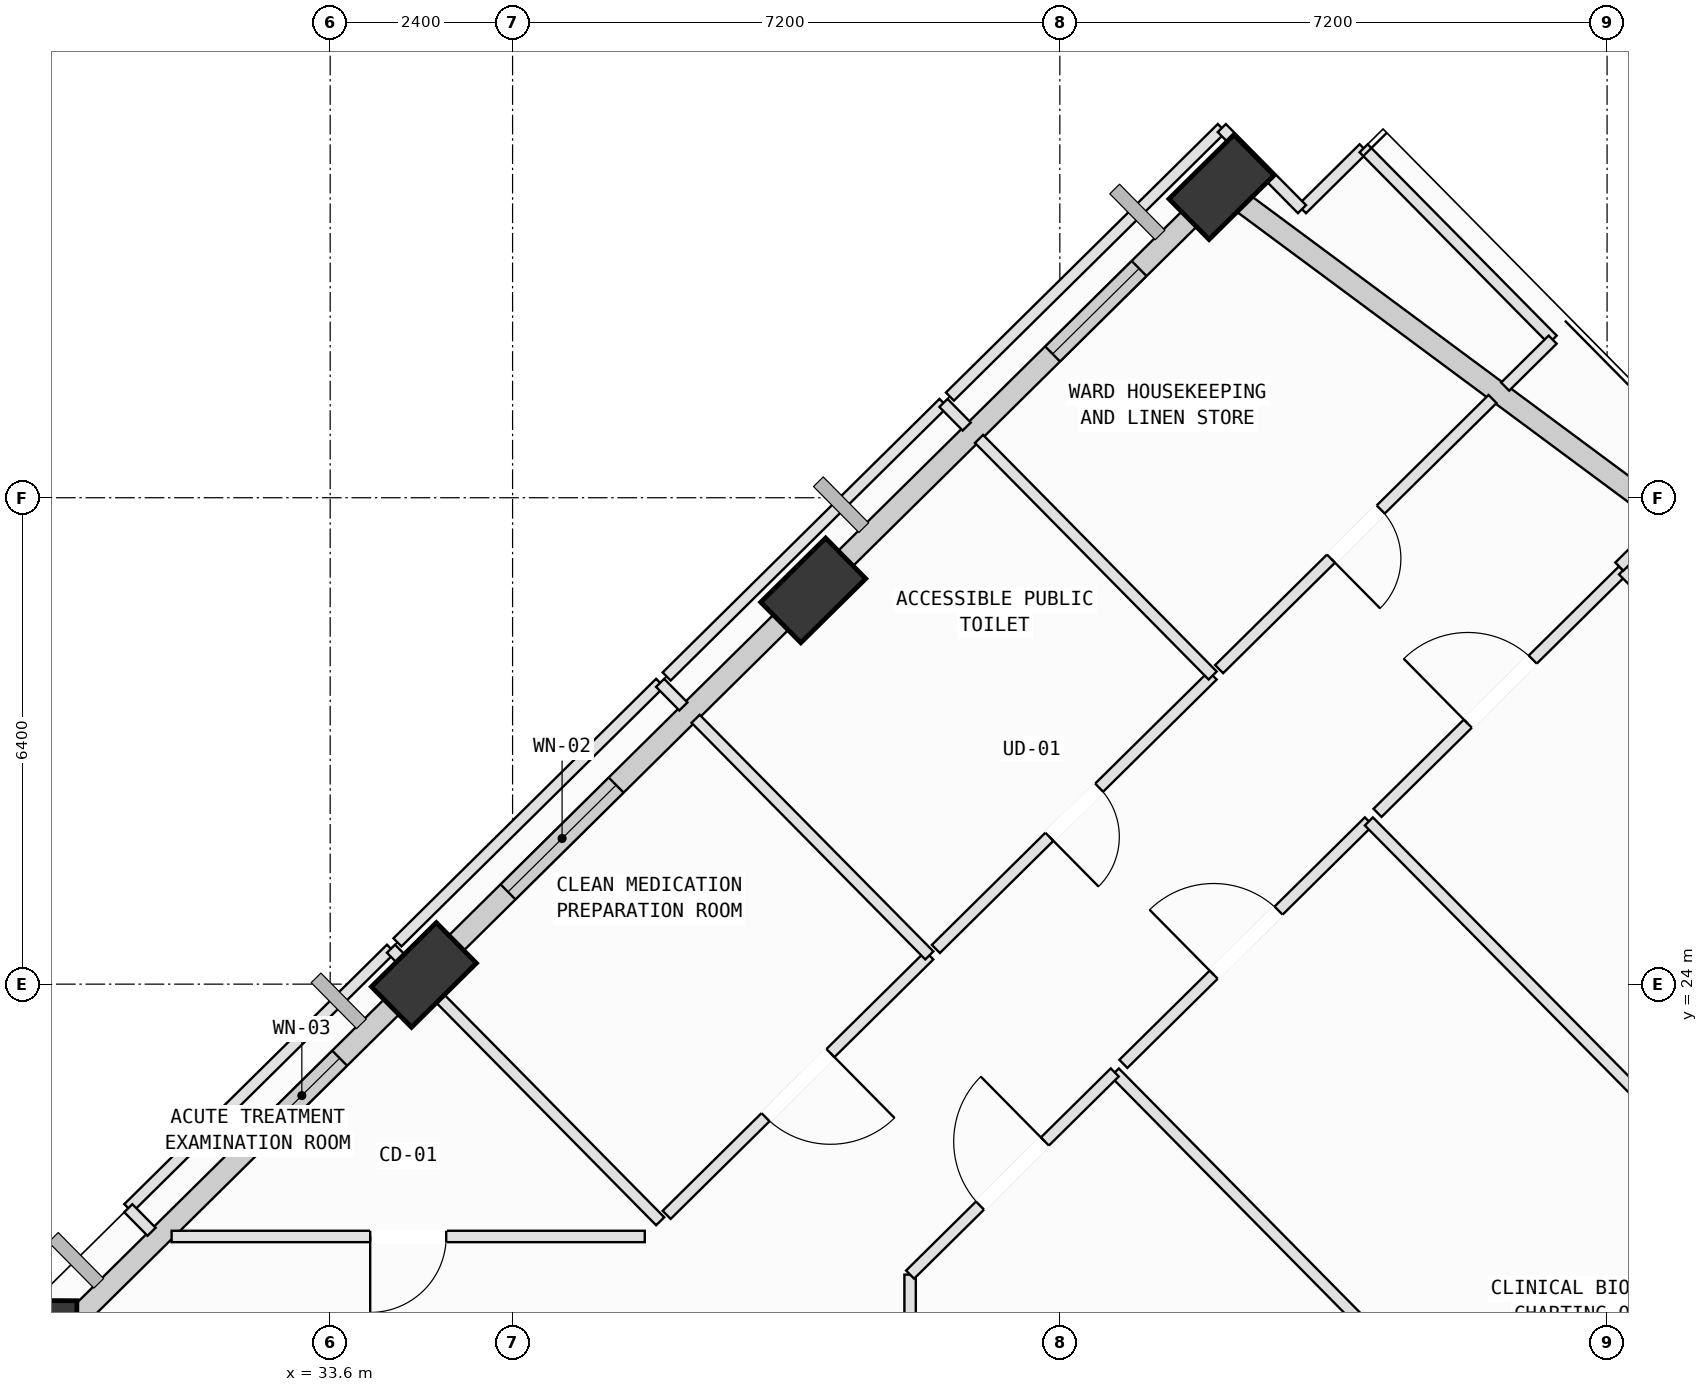
"""IFC4 building model, lengths in metres.
Left out: names, types, materials, properties, quantities, classifications, styles, units other than length and angle.
Written with IfcOpenShell. Run it as: python <this file> out.ifc"""

import sys

from ifc_helpers import new_model, si_unit, direction, frame, frame_2d, origin, origin_2d, place, context, subcontext, project, spatial, rectangle, extrude, element, fill, save


model = new_model("IFC4")
c1 = context("Model", 3, precision=1e-05, world=origin(), true_north=direction((0.0, 1.0)))
c2 = subcontext(c1, "Body", "Model", "MODEL_VIEW")
j1 = project(units=[si_unit("LENGTHUNIT", "METRE"), si_unit("PLANEANGLEUNIT", "RADIAN")], contexts=[c1])
p1 = place(None, origin())
s1 = spatial("IfcSite", under=j1, at=p1, CompositionType="ELEMENT")
p2 = place(p1, origin())
s2 = spatial("IfcBuilding", under=s1, at=p2, CompositionType="ELEMENT")
p3 = place(p2, frame((0.0, 0.0, 215.2)))
s3 = spatial("IfcBuildingStorey", under=s2, at=p3, CompositionType="ELEMENT", Elevation=215.2)
p4 = place(p3, frame((45.327, 34.487, 0.002), z_axis=(-0.040484105469, 0.048166330302, 0.998018557858), x_axis=(-0.093314100601, -0.994654303184, 0.044218726661)))
e1 = element("IfcColumn", 1, at=p4, inside=s3, PredefinedType="COLUMN", context=c2, shape_type="SweptSolid", body=[
    extrude(rectangle(XDim=1.2, YDim=0.75, at=origin_2d()), origin(), (0.0, 0.0, 1.0), 4.004),
])
p5 = place(p3, frame((39.956, 29.181, 0.002), z_axis=(-0.018379000331, 0.026194654957, 0.999487895074), x_axis=(-0.178927925316, -0.983605143605, 0.022488197268)))
e2 = element("IfcColumn", 2, at=p5, inside=s3, PredefinedType="COLUMN", context=c2, shape_type="SweptSolid", body=[
    extrude(rectangle(XDim=1.2, YDim=0.75, at=origin_2d()), origin(), (0.0, 0.0, 1.0), 3.998),
])
p6 = place(p3, frame((34.833, 24.121, 0.002), z_axis=(0.002810141897, 0.005131563464, 0.999982884933), x_axis=(-0.961524635642, -0.274687948817, 0.004111669677)))
e3 = element("IfcColumn", 3, at=p6, inside=s3, PredefinedType="COLUMN", context=c2, shape_type="SweptSolid", body=[
    extrude(rectangle(XDim=1.2, YDim=0.75, at=origin_2d()), origin(), (0.0, 0.0, 1.0), 3.996),
])
p7 = place(p3, frame((29.889, 19.236, 0.002), z_axis=(0.023205698391, -0.015144771581, 0.999615991997), x_axis=(-0.83375940471, 0.551432149195, 0.027709924051)))
e4 = element("IfcColumn", 4, at=p7, inside=s3, PredefinedType="COLUMN", context=c2, shape_type="SweptSolid", body=[
    extrude(rectangle(XDim=1.2, YDim=0.75, at=origin_2d()), origin(), (0.0, 0.0, 1.0), 3.998),
])
p8 = place(p3, frame((45.547, 34.323, 0.0), z_axis=(0.0, 0.0, 1.0), x_axis=(0.803236884765, -0.595659724131, 0.0)))
e5 = element("IfcWall", 5, at=p8, inside=s3, PredefinedType="SOLIDWALL", context=c2, shape_type="SweptSolid", body=[
    extrude(rectangle(XDim=9.036, YDim=0.28, at=frame_2d((4.518, 0.0))), origin(), (0.0, 0.0, 1.0), 3.265),
])
p9 = place(p3, frame((40.242, 29.464, 0.0), z_axis=(0.0, 0.0, 1.0), x_axis=(0.711432569106, 0.702754366486, 0.0)))
e6 = element("IfcWall", 6, at=p9, inside=s3, PredefinedType="SOLIDWALL", context=c2, shape_type="SweptSolid", body=[
    extrude(rectangle(XDim=6.78, YDim=0.28, at=frame_2d((3.39, 0.0))), origin(), (0.0, 0.0, 1.0), 3.165),
])
p10 = place(p9, frame((4.024, 0.0, 0.75)))
e7 = element("IfcOpeningElement", 7, at=p10, cuts=e6, PredefinedType="OPENING", context=c2, shape_type="SweptSolid", body=[
    extrude(rectangle(XDim=1.6, YDim=1.95, at=frame_2d((0.8, 0.975))), frame((0.0, 0.15, 0.0), z_axis=(0.0, -1.0, 0.0), x_axis=(1.0, 0.0, 0.0)), (0.0, 0.0, 1.0), 0.3),
])
p11 = place(p3, frame((35.124, 24.408, 0.0), z_axis=(0.0, 0.0, 1.0), x_axis=(0.711416839959, 0.702770289513, 0.0)))
e8 = element("IfcWall", 8, at=p11, inside=s3, PredefinedType="SOLIDWALL", context=c2, shape_type="SweptSolid", body=[
    extrude(rectangle(XDim=6.409, YDim=0.28, at=frame_2d((3.205, 0.0))), origin(), (0.0, 0.0, 1.0), 3.265),
])
p12 = place(p11, frame((1.146, 0.0, 0.75)))
e9 = element("IfcOpeningElement", 9, at=p12, cuts=e8, PredefinedType="OPENING", context=c2, shape_type="SweptSolid", body=[
    extrude(rectangle(XDim=2.0, YDim=1.95, at=frame_2d((1.0, 0.975))), frame((0.0, 0.15, 0.0), z_axis=(0.0, -1.0, 0.0), x_axis=(1.0, 0.0, 0.0)), (0.0, 0.0, 1.0), 0.3),
])
p13 = place(p3, frame((30.177, 19.521, 0.0), z_axis=(0.0, 0.0, 1.0), x_axis=(0.711415033641, 0.702772118051, 0.0)))
e10 = element("IfcWall", 10, at=p13, inside=s3, PredefinedType="SOLIDWALL", context=c2, shape_type="SweptSolid", body=[
    extrude(rectangle(XDim=6.158, YDim=0.28, at=frame_2d((3.079, 0.0))), origin(), (0.0, 0.0, 1.0), 3.165),
])
p14 = place(p13, frame((3.587, 0.0, 0.75)))
e11 = element("IfcOpeningElement", 11, at=p14, cuts=e10, PredefinedType="OPENING", context=c2, shape_type="SweptSolid", body=[
    extrude(rectangle(XDim=1.4, YDim=1.85, at=frame_2d((0.7, 0.925))), frame((0.0, 0.15, 0.0), z_axis=(0.0, -1.0, 0.0), x_axis=(1.0, 0.0, 0.0)), (0.0, 0.0, 1.0), 0.3),
])
p15 = place(p3, frame((43.923, 22.838, 0.0), z_axis=(0.0, 0.0, 1.0), x_axis=(0.702757042413, -0.711429925811, 0.0)))
e12 = element("IfcWall", 12, at=p15, inside=s3, PredefinedType="PARTITIONING", context=c2, shape_type="SweptSolid", body=[
    extrude(rectangle(XDim=13.484, YDim=0.15, at=frame_2d((6.742, 0.0))), origin(), (0.0, 0.0, 1.0), 3.415),
])
p16 = place(p3, frame((41.23, 19.054, 0.0), z_axis=(0.0, 0.0, 1.0), x_axis=(0.0, 1.0, 0.0)))
e13 = element("IfcWall", 13, at=p16, inside=s3, PredefinedType="PARTITIONING", context=c2, shape_type="SweptSolid", body=[
    extrude(rectangle(XDim=1.124, YDim=0.15, at=frame_2d((0.562, 0.0))), origin(), (0.0, 0.0, 1.0), 3.78),
])
p17 = place(p3, frame((41.23, 20.178, 0.0), z_axis=(0.0, 0.0, 1.0), x_axis=(0.711479053184, 0.70270730527, 0.0)))
e14 = element("IfcWall", 14, at=p17, inside=s3, PredefinedType="PARTITIONING", context=c2, shape_type="SweptSolid", body=[
    extrude(rectangle(XDim=3.785, YDim=0.15, at=frame_2d((1.893, 0.0))), origin(), (0.0, 0.0, 1.0), 3.78),
])
p18 = place(p17, frame((1.292, 0.0, 0.0)))
e15 = element("IfcOpeningElement", 15, at=p18, cuts=e14, PredefinedType="OPENING", context=c2, shape_type="SweptSolid", body=[
    extrude(rectangle(XDim=1.2, YDim=2.15, at=frame_2d((0.6, 1.075))), frame((0.0, 0.085, 0.0), z_axis=(0.0, -1.0, 0.0), x_axis=(1.0, 0.0, 0.0)), (0.0, 0.0, 1.0), 0.17),
])
p19 = place(p3, frame((44.036, 22.951, 0.0), z_axis=(0.0, 0.0, 1.0), x_axis=(0.711502616413, 0.702683447107, 0.0)))
e16 = element("IfcWall", 16, at=p19, inside=s3, PredefinedType="PARTITIONING", context=c2, shape_type="SweptSolid", body=[
    extrude(rectangle(XDim=4.54, YDim=0.15, at=frame_2d((2.27, 0.0))), origin(), (0.0, 0.0, 1.0), 3.78),
])
p20 = place(p19, frame((1.67, 0.0, 0.0)))
e17 = element("IfcOpeningElement", 17, at=p20, cuts=e16, PredefinedType="OPENING", context=c2, shape_type="SweptSolid", body=[
    extrude(rectangle(XDim=1.2, YDim=2.15, at=frame_2d((0.6, 1.075))), frame((0.0, 0.085, 0.0), z_axis=(0.0, -1.0, 0.0), x_axis=(1.0, 0.0, 0.0)), (0.0, 0.0, 1.0), 0.17),
])
p21 = place(p3, frame((47.266, 26.141, 0.0), z_axis=(0.0, 0.0, 1.0), x_axis=(0.702821292956, -0.711366452799, 0.0)))
e18 = element("IfcWall", 18, at=p21, inside=s3, PredefinedType="PARTITIONING", context=c2, shape_type="SweptSolid", body=[
    extrude(rectangle(XDim=13.485, YDim=0.15, at=frame_2d((6.743, 0.0))), origin(), (0.0, 0.0, 1.0), 3.78),
])
p22 = place(p3, frame((47.38, 26.254, 0.0), z_axis=(0.0, 0.0, 1.0), x_axis=(0.711502616413, 0.702683447107, 0.0)))
e19 = element("IfcWall", 19, at=p22, inside=s3, PredefinedType="PARTITIONING", context=c2, shape_type="SweptSolid", body=[
    extrude(rectangle(XDim=4.54, YDim=0.15, at=frame_2d((2.27, 0.0))), origin(), (0.0, 0.0, 1.0), 3.78),
])
p23 = place(p22, frame((1.67, 0.0, 0.0)))
e20 = element("IfcOpeningElement", 20, at=p23, cuts=e19, PredefinedType="OPENING", context=c2, shape_type="SweptSolid", body=[
    extrude(rectangle(XDim=1.2, YDim=2.15, at=frame_2d((0.6, 1.075))), frame((0.0, 0.085, 0.0), z_axis=(0.0, -1.0, 0.0), x_axis=(1.0, 0.0, 0.0)), (0.0, 0.0, 1.0), 0.17),
])
p24 = place(p3, frame((50.61, 29.444, 0.0), z_axis=(0.0, 0.0, 1.0), x_axis=(0.702781267374, -0.711405995356, 0.0)))
e21 = element("IfcWall", 21, at=p24, inside=s3, PredefinedType="PARTITIONING", context=c2, shape_type="SweptSolid", body=[
    extrude(rectangle(XDim=10.927, YDim=0.15, at=frame_2d((5.463, 0.0))), origin(), (0.0, 0.0, 1.0), 3.78),
])
p25 = place(p3, frame((30.944, 21.052, 0.0), z_axis=(0.0, 0.0, 1.0), x_axis=(0.711390715855, 0.702796734053, 0.0)))
e22 = element("IfcWall", 22, at=p25, inside=s3, PredefinedType="PARTITIONING", context=c2, shape_type="SweptSolid", body=[
    extrude(rectangle(XDim=4.858, YDim=0.15, at=frame_2d((2.429, 0.0))), origin(), (0.0, 0.0, 1.0), 3.78),
])
p26 = place(p3, frame((34.4, 24.466, 0.0), z_axis=(0.0, 0.0, 1.0), x_axis=(0.70270973466, -0.711476653738, 0.0)))
e23 = element("IfcWall", 23, at=p26, inside=s3, PredefinedType="PARTITIONING", context=c2, shape_type="SweptSolid", body=[
    extrude(rectangle(XDim=5.041, YDim=0.15, at=frame_2d((2.52, 0.0))), origin(), (0.0, 0.0, 1.0), 3.78),
])
p27 = place(p3, frame((37.739, 20.68, 0.0), z_axis=(0.0, 0.0, 1.0), x_axis=(-1.0, 0.0, 0.0)))
e24 = element("IfcWall", 24, at=p27, inside=s3, PredefinedType="PARTITIONING", context=c2, shape_type="SweptSolid", body=[
    extrude(rectangle(XDim=6.225, YDim=0.15, at=frame_2d((3.113, 0.0))), origin(), (0.0, 0.0, 1.0), 3.78),
])
p28 = place(p27, frame((2.613, 0.0, 0.0)))
e25 = element("IfcOpeningElement", 25, at=p28, cuts=e24, PredefinedType="OPENING", context=c2, shape_type="SweptSolid", body=[
    extrude(rectangle(XDim=1.0, YDim=2.12, at=frame_2d((0.5, 1.06))), frame((0.0, 0.085, 0.0), z_axis=(0.0, -1.0, 0.0), x_axis=(1.0, 0.0, 0.0)), (0.0, 0.0, 1.0), 0.17),
])
p29 = place(p3, frame((31.25, 20.742, 0.0), z_axis=(0.0, 0.0, 1.0), x_axis=(-0.702326345506, 0.711855114759, 0.0)))
e26 = element("IfcWall", 26, at=p29, inside=s3, PredefinedType="PARTITIONING", context=c2, shape_type="SweptSolid", body=[
    extrude(rectangle(XDim=0.436, YDim=0.15, at=frame_2d((0.218, 0.0))), origin(), (0.0, 0.0, 1.0), 3.78),
])
p30 = place(p3, frame((41.483, 24.378, 0.0), z_axis=(0.0, 0.0, 1.0), x_axis=(-0.711415843034, -0.702771298703, 0.0)))
e27 = element("IfcWall", 27, at=p30, inside=s3, PredefinedType="PARTITIONING", context=c2, shape_type="SweptSolid", body=[
    extrude(rectangle(XDim=4.858, YDim=0.15, at=frame_2d((2.429, 0.0))), origin(), (0.0, 0.0, 1.0), 3.165),
])
p31 = place(p30, frame((1.829, 0.0, 0.0)))
e28 = element("IfcOpeningElement", 28, at=p31, cuts=e27, PredefinedType="OPENING", context=c2, shape_type="SweptSolid", body=[
    extrude(rectangle(XDim=1.2, YDim=2.15, at=frame_2d((0.6, 1.075))), frame((0.0, 0.085, 0.0), z_axis=(0.0, -1.0, 0.0), x_axis=(1.0, 0.0, 0.0)), (0.0, 0.0, 1.0), 0.17),
])
p32 = place(p3, frame((34.485, 24.55, 0.0), z_axis=(0.0, 0.0, 1.0), x_axis=(0.711390715855, 0.702796734053, 0.0)))
e29 = element("IfcWall", 29, at=p32, inside=s3, PredefinedType="PARTITIONING", context=c2, shape_type="SweptSolid", body=[
    extrude(rectangle(XDim=4.858, YDim=0.15, at=frame_2d((2.429, 0.0))), origin(), (0.0, 0.0, 1.0), 3.78),
])
p33 = place(p3, frame((37.941, 27.964, 0.0), z_axis=(0.0, 0.0, 1.0), x_axis=(0.702610212359, -0.711574935962, 0.0)))
e30 = element("IfcWall", 30, at=p33, inside=s3, PredefinedType="PARTITIONING", context=c2, shape_type="SweptSolid", body=[
    extrude(rectangle(XDim=0.436, YDim=0.15, at=frame_2d((0.218, 0.0))), origin(), (0.0, 0.0, 1.0), 3.78),
])
p34 = place(p3, frame((38.408, 27.491, 0.0), z_axis=(0.0, 0.0, 1.0), x_axis=(0.702741357697, -0.711445418976, 0.0)))
e31 = element("IfcWall", 31, at=p34, inside=s3, PredefinedType="PARTITIONING", context=c2, shape_type="SweptSolid", body=[
    extrude(rectangle(XDim=4.376, YDim=0.15, at=frame_2d((2.188, 0.0))), origin(), (0.0, 0.0, 1.0), 3.415),
])
p35 = place(p3, frame((45.211, 28.061, 0.0), z_axis=(0.0, 0.0, 1.0), x_axis=(-0.711361976558, -0.702825823592, 0.0)))
e32 = element("IfcWall", 32, at=p35, inside=s3, PredefinedType="PARTITIONING", context=c2, shape_type="SweptSolid", body=[
    extrude(rectangle(XDim=5.12, YDim=0.15, at=frame_2d((2.56, 0.0))), origin(), (0.0, 0.0, 1.0), 3.78),
])
p36 = place(p35, frame((2.1, 0.0, 0.0)))
e33 = element("IfcOpeningElement", 33, at=p36, cuts=e32, PredefinedType="OPENING", context=c2, shape_type="SweptSolid", body=[
    extrude(rectangle(XDim=0.92, YDim=2.1, at=frame_2d((0.46, 1.05))), frame((0.0, 0.085, 0.0), z_axis=(0.0, -1.0, 0.0), x_axis=(1.0, 0.0, 0.0)), (0.0, 0.0, 1.0), 0.17),
])
p37 = place(p3, frame((38.027, 28.048, 0.0), z_axis=(0.0, 0.0, 1.0), x_axis=(0.711290453271, 0.702898208196, 0.0)))
e34 = element("IfcWall", 34, at=p37, inside=s3, PredefinedType="PARTITIONING", context=c2, shape_type="SweptSolid", body=[
    extrude(rectangle(XDim=5.12, YDim=0.15, at=frame_2d((2.56, 0.0))), origin(), (0.0, 0.0, 1.0), 3.265),
])
p38 = place(p3, frame((41.669, 31.647, 0.0), z_axis=(0.0, 0.0, 1.0), x_axis=(0.702610212359, -0.711574935962, 0.0)))
e35 = element("IfcWall", 35, at=p38, inside=s3, PredefinedType="PARTITIONING", context=c2, shape_type="SweptSolid", body=[
    extrude(rectangle(XDim=0.436, YDim=0.15, at=frame_2d((0.218, 0.0))), origin(), (0.0, 0.0, 1.0), 3.78),
])
p39 = place(p3, frame((42.137, 31.174, 0.0), z_axis=(0.0, 0.0, 1.0), x_axis=(0.702628367002, -0.711557009581, 0.0)))
e36 = element("IfcWall", 36, at=p39, inside=s3, PredefinedType="PARTITIONING", context=c2, shape_type="SweptSolid", body=[
    extrude(rectangle(XDim=4.375, YDim=0.15, at=frame_2d((2.188, 0.0))), origin(), (0.0, 0.0, 1.0), 3.78),
])
p40 = place(p3, frame((46.386, 34.197, 0.0), z_axis=(0.0, 0.0, 1.0), x_axis=(0.711483702843, 0.70270259754, 0.0)))
e37 = element("IfcWall", 37, at=p40, inside=s3, PredefinedType="PARTITIONING", context=c2, shape_type="SweptSolid", body=[
    extrude(rectangle(XDim=1.14, YDim=0.15, at=frame_2d((0.57, 0.0))), origin(), (0.0, 0.0, 1.0), 3.78),
])
p41 = place(p3, frame((47.197, 34.998, 0.0), z_axis=(0.0, 0.0, 1.0), x_axis=(0.70271289867, -0.711473528701, 0.0)))
e38 = element("IfcWall", 38, at=p41, inside=s3, PredefinedType="PARTITIONING", context=c2, shape_type="SweptSolid", body=[
    extrude(rectangle(XDim=3.539, YDim=0.15, at=frame_2d((1.77, 0.0))), origin(), (0.0, 0.0, 1.0), 3.78),
])
p42 = place(p3, frame((49.684, 32.48, 0.0), z_axis=(0.0, 0.0, 1.0), x_axis=(-0.711123155313, -0.703067463319, 0.0)))
e39 = element("IfcWall", 39, at=p42, inside=s3, PredefinedType="PARTITIONING", context=c2, shape_type="SweptSolid", body=[
    extrude(rectangle(XDim=0.879, YDim=0.15, at=frame_2d((0.439, 0.0))), origin(), (0.0, 0.0, 1.0), 3.78),
])
p43 = place(p3, frame((48.893, 31.699, 0.0), z_axis=(0.0, 0.0, 1.0), x_axis=(-0.711366706514, -0.702821036156, 0.0)))
e40 = element("IfcWall", 40, at=p43, inside=s3, PredefinedType="PARTITIONING", context=c2, shape_type="SweptSolid", body=[
    extrude(rectangle(XDim=5.057, YDim=0.15, at=frame_2d((2.528, 0.0))), origin(), (0.0, 0.0, 1.0), 3.78),
])
p44 = place(p43, frame((2.068, 0.0, 0.0)))
e41 = element("IfcOpeningElement", 41, at=p44, cuts=e40, PredefinedType="OPENING", context=c2, shape_type="SweptSolid", body=[
    extrude(rectangle(XDim=0.92, YDim=2.1, at=frame_2d((0.46, 1.05))), frame((0.0, 0.085, 0.0), z_axis=(0.0, -1.0, 0.0), x_axis=(1.0, 0.0, 0.0)), (0.0, 0.0, 1.0), 0.17),
])
p45 = place(p3, frame((41.754, 31.731, 0.0), z_axis=(0.0, 0.0, 1.0), x_axis=(0.711487722313, 0.702698527818, 0.0)))
e42 = element("IfcWall", 42, at=p45, inside=s3, PredefinedType="PARTITIONING", context=c2, shape_type="SweptSolid", body=[
    extrude(rectangle(XDim=5.028, YDim=0.15, at=frame_2d((2.514, 0.0))), origin(), (0.0, 0.0, 1.0), 3.165),
])
p46 = place(p3, frame((45.331, 35.264, 0.0), z_axis=(0.0, 0.0, 1.0), x_axis=(0.703108926748, -0.711082159196, 0.0)))
e43 = element("IfcWall", 43, at=p46, inside=s3, PredefinedType="PARTITIONING", context=c2, shape_type="SweptSolid", body=[
    extrude(rectangle(XDim=1.5, YDim=0.15, at=frame_2d((0.75, 0.0))), origin(), (0.0, 0.0, 1.0), 3.265),
])
p47 = place(p3, frame((50.561, 29.494, 0.0), z_axis=(0.0, 0.0, 1.0), x_axis=(0.710821800861, 0.703372140066, 0.0)))
e44 = element("IfcWall", 44, at=p47, inside=s3, PredefinedType="PARTITIONING", context=c2, shape_type="SweptSolid", body=[
    extrude(rectangle(XDim=0.787, YDim=0.15, at=frame_2d((0.393, 0.0))), origin(), (0.0, 0.0, 1.0), 3.78),
])
p48 = place(p10, origin())
e45 = element("IfcWindow", 45, at=p48, inside=s3, PartitioningType="SINGLE_PANEL", PredefinedType="WINDOW", context=c2, shape_type="SweptSolid", body=[
    extrude(rectangle(XDim=1.6, YDim=1.95, at=frame_2d((0.8, 0.975))), frame((0.0, 0.03, 0.0), z_axis=(0.0, -1.0, 0.0), x_axis=(1.0, 0.0, 0.0)), (0.0, 0.0, 1.0), 0.06),
])
fill(e7, e45)
p49 = place(p12, origin())
e46 = element("IfcWindow", 46, at=p49, inside=s3, PartitioningType="SINGLE_PANEL", PredefinedType="WINDOW", context=c2, shape_type="SweptSolid", body=[
    extrude(rectangle(XDim=2.0, YDim=1.95, at=frame_2d((1.0, 0.975))), frame((0.0, 0.03, 0.0), z_axis=(0.0, -1.0, 0.0), x_axis=(1.0, 0.0, 0.0)), (0.0, 0.0, 1.0), 0.06),
])
fill(e9, e46)
p50 = place(p14, origin())
e47 = element("IfcWindow", 47, at=p50, inside=s3, PartitioningType="SINGLE_PANEL", PredefinedType="WINDOW", context=c2, shape_type="SweptSolid", body=[
    extrude(rectangle(XDim=1.4, YDim=1.85, at=frame_2d((0.7, 0.925))), frame((0.0, 0.03, 0.0), z_axis=(0.0, -1.0, 0.0), x_axis=(1.0, 0.0, 0.0)), (0.0, 0.0, 1.0), 0.06),
])
fill(e11, e47)
p51 = place(p18, origin())
e48 = element("IfcDoor", 48, at=p51, inside=s3, OperationType="SINGLE_SWING_RIGHT", PredefinedType="DOOR", context=c2, shape_type="SweptSolid", body=[
    extrude(rectangle(XDim=1.2, YDim=2.15, at=frame_2d((0.6, 1.075))), frame((0.0, 0.025, 0.0), z_axis=(0.0, -1.0, 0.0), x_axis=(1.0, 0.0, 0.0)), (0.0, 0.0, 1.0), 0.05),
])
fill(e15, e48)
p52 = place(p20, origin())
e49 = element("IfcDoor", 49, at=p52, inside=s3, OperationType="SINGLE_SWING_LEFT", PredefinedType="DOOR", context=c2, shape_type="SweptSolid", body=[
    extrude(rectangle(XDim=1.2, YDim=2.15, at=frame_2d((0.6, 1.075))), frame((0.0, 0.025, 0.0), z_axis=(0.0, -1.0, 0.0), x_axis=(1.0, 0.0, 0.0)), (0.0, 0.0, 1.0), 0.05),
])
fill(e17, e49)
p53 = place(p23, origin())
e50 = element("IfcDoor", 50, at=p53, inside=s3, OperationType="SINGLE_SWING_LEFT", PredefinedType="DOOR", context=c2, shape_type="SweptSolid", body=[
    extrude(rectangle(XDim=1.2, YDim=2.15, at=frame_2d((0.6, 1.075))), frame((0.0, 0.025, 0.0), z_axis=(0.0, -1.0, 0.0), x_axis=(1.0, 0.0, 0.0)), (0.0, 0.0, 1.0), 0.05),
])
fill(e20, e50)
p54 = place(p28, origin())
e51 = element("IfcDoor", 51, at=p54, inside=s3, OperationType="SINGLE_SWING_RIGHT", PredefinedType="DOOR", context=c2, shape_type="SweptSolid", body=[
    extrude(rectangle(XDim=1.0, YDim=2.12, at=frame_2d((0.5, 1.06))), frame((0.0, 0.025, 0.0), z_axis=(0.0, -1.0, 0.0), x_axis=(1.0, 0.0, 0.0)), (0.0, 0.0, 1.0), 0.05),
])
fill(e25, e51)
p55 = place(p31, origin())
e52 = element("IfcDoor", 52, at=p55, inside=s3, OperationType="SINGLE_SWING_LEFT", PredefinedType="DOOR", context=c2, shape_type="SweptSolid", body=[
    extrude(rectangle(XDim=1.2, YDim=2.15, at=frame_2d((0.6, 1.075))), frame((0.0, 0.025, 0.0), z_axis=(0.0, -1.0, 0.0), x_axis=(1.0, 0.0, 0.0)), (0.0, 0.0, 1.0), 0.05),
])
fill(e28, e52)
p56 = place(p36, origin())
e53 = element("IfcDoor", 53, at=p56, inside=s3, OperationType="SINGLE_SWING_RIGHT", PredefinedType="DOOR", context=c2, shape_type="SweptSolid", body=[
    extrude(rectangle(XDim=0.92, YDim=2.1, at=frame_2d((0.46, 1.05))), frame((0.0, 0.025, 0.0), z_axis=(0.0, -1.0, 0.0), x_axis=(1.0, 0.0, 0.0)), (0.0, 0.0, 1.0), 0.05),
])
fill(e33, e53)
p57 = place(p44, origin())
e54 = element("IfcDoor", 54, at=p57, inside=s3, OperationType="SINGLE_SWING_RIGHT", PredefinedType="DOOR", context=c2, shape_type="SweptSolid", body=[
    extrude(rectangle(XDim=0.92, YDim=2.1, at=frame_2d((0.46, 1.05))), frame((0.0, 0.025, 0.0), z_axis=(0.0, -1.0, 0.0), x_axis=(1.0, 0.0, 0.0)), (0.0, 0.0, 1.0), 0.05),
])
fill(e41, e54)
save(model, sys.argv[1])
